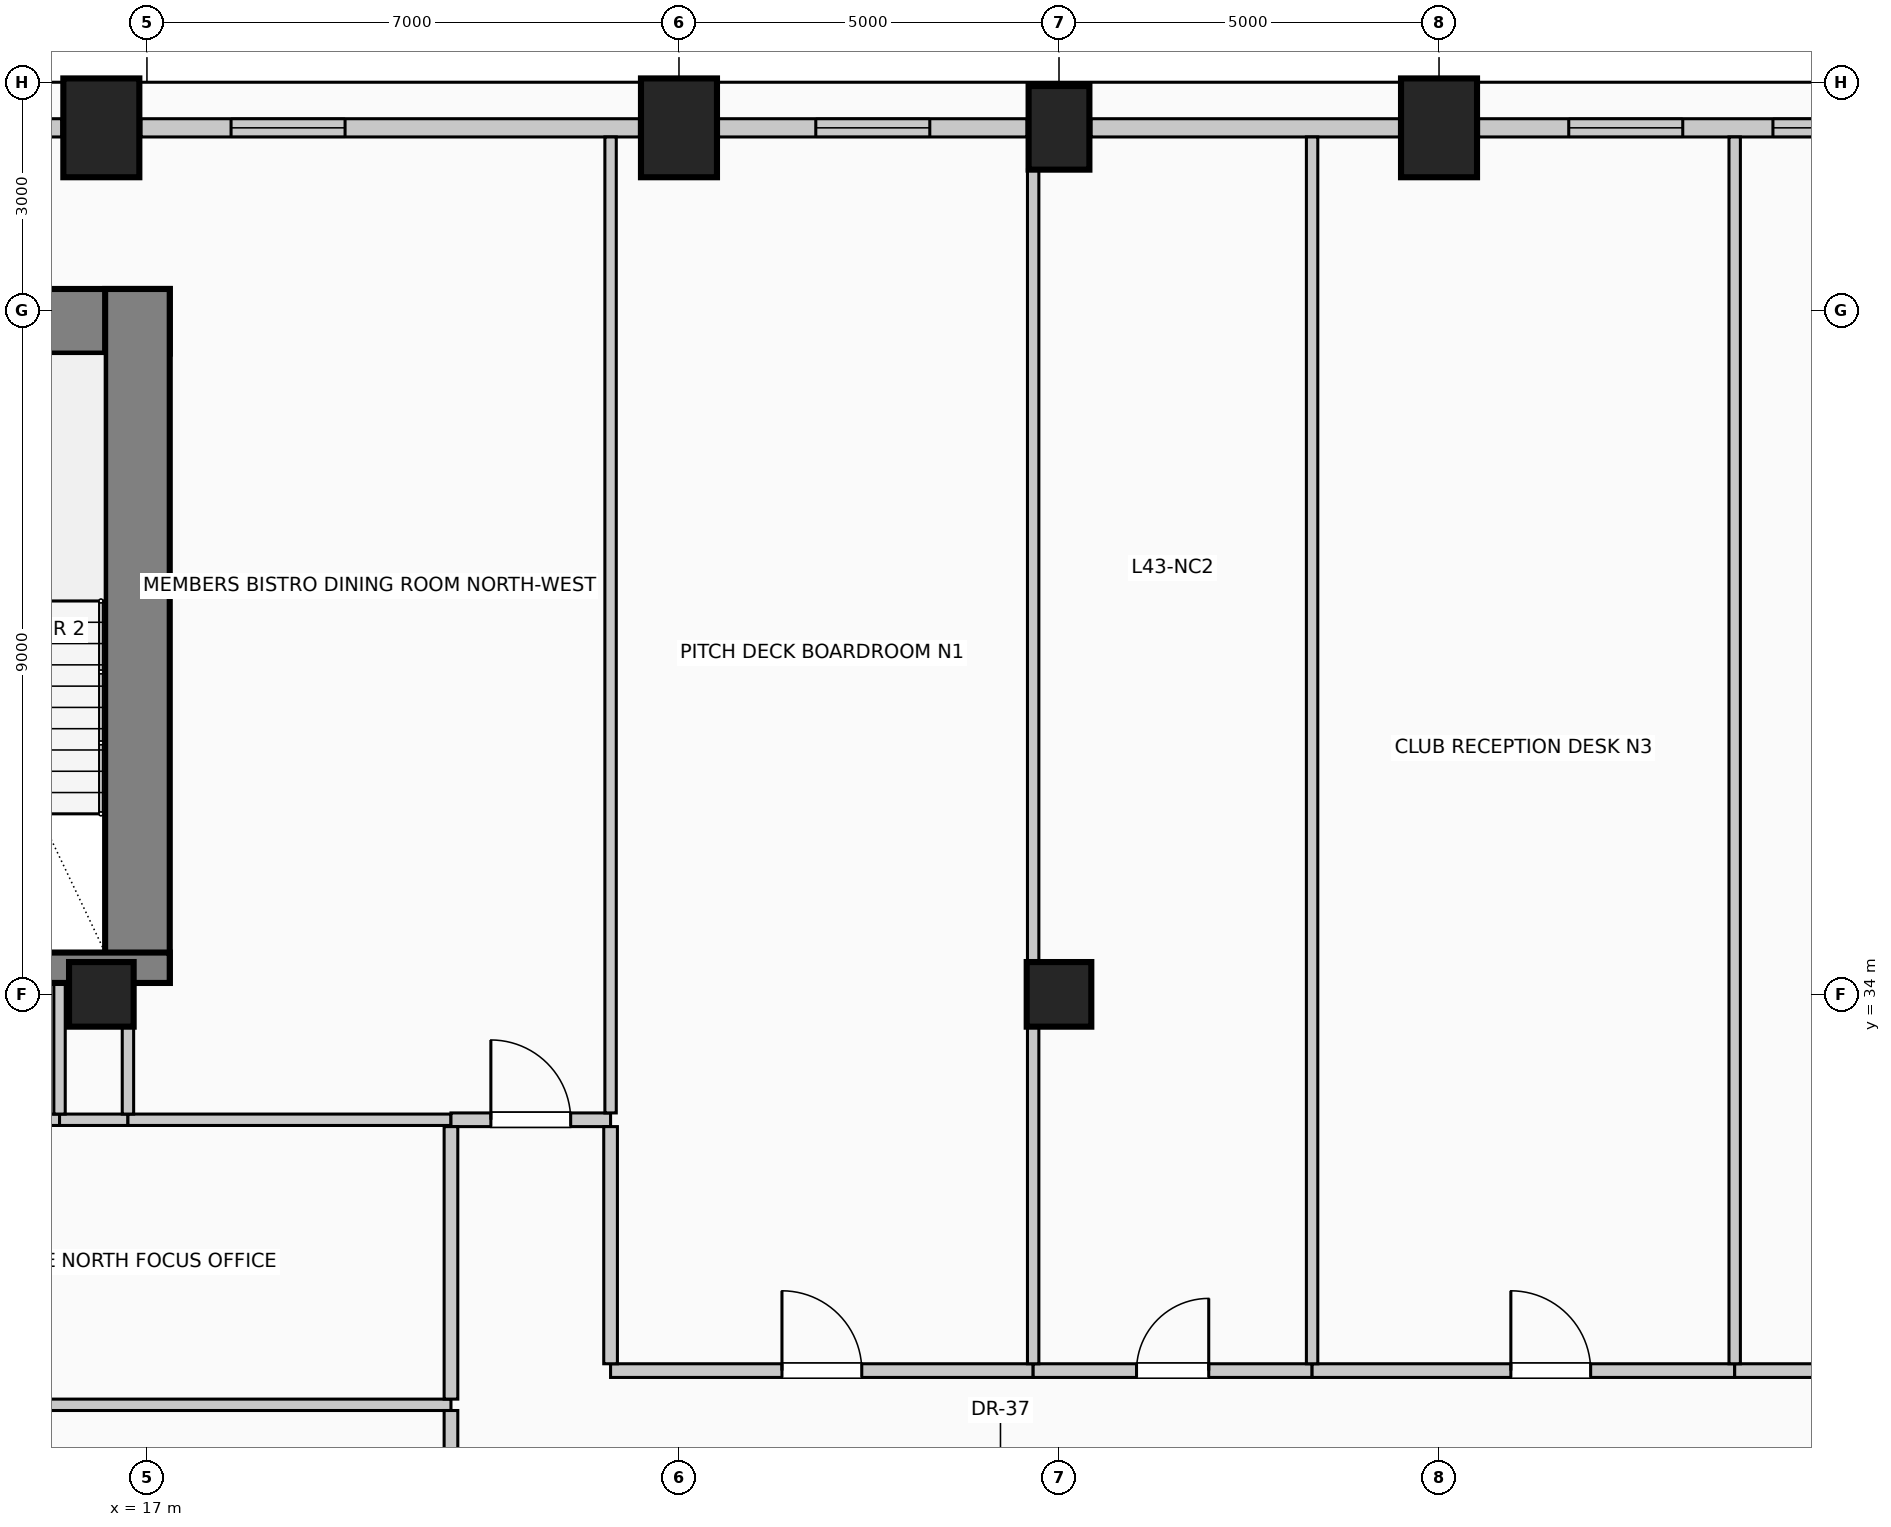
"""IFC4 building model, lengths in metres.
Left out: names, types, materials, properties, quantities, classifications, styles, units other than length and angle.
Written with IfcOpenShell. Run it as: python <this file> out.ifc"""

import sys

from ifc_helpers import new_model, si_unit, direction, frame, frame_2d, origin, origin_2d, place, context, subcontext, project, spatial, rectangle, circle, extrude, element, fill, save


model = new_model("IFC4")
c1 = context("Model", 3, precision=1e-05, world=origin(), true_north=direction((0.0, 1.0)))
c2 = subcontext(c1, "Body", "Model", "MODEL_VIEW")
j1 = project(units=[si_unit("LENGTHUNIT", "METRE"), si_unit("PLANEANGLEUNIT", "RADIAN")], contexts=[c1])
p1 = place(None, origin())
s1 = spatial("IfcSite", under=j1, at=p1, CompositionType="ELEMENT")
p2 = place(p1, origin())
s2 = spatial("IfcBuilding", under=s1, at=p2, CompositionType="ELEMENT")
p3 = place(p2, frame((0.0, 0.0, 178.6)))
s3 = spatial("IfcBuildingStorey", under=s2, at=p3, CompositionType="ELEMENT", Elevation=178.6)
p4 = place(p3, frame((2.7, 42.855, 0.0), z_axis=(0.0, 0.0, 1.0), x_axis=(1.0, 0.0, 0.0)))
e1 = element("IfcWall", 1, at=p4, inside=s3, PredefinedType="SHEAR", context=c2, shape_type="SweptSolid", body=[
    extrude(rectangle(XDim=14.6, YDim=0.85, at=frame_2d((7.3, 0.0))), origin(), (0.0, 0.0, 1.0), 4.0),
])
p5 = place(p3, frame((16.875, 34.15, 0.0), z_axis=(0.0, 0.0, 1.0), x_axis=(0.0, 1.0, 0.0)))
e2 = element("IfcWall", 2, at=p5, inside=s3, PredefinedType="SHEAR", context=c2, shape_type="SweptSolid", body=[
    extrude(rectangle(XDim=9.13, YDim=0.85, at=frame_2d((4.565, 0.0))), origin(), (0.0, 0.0, 1.0), 4.0),
])
p6 = place(p3, frame((12.29, 34.35, 0.0), z_axis=(0.0, 0.0, 1.0), x_axis=(1.0, 0.0, 0.0)))
e3 = element("IfcWall", 3, at=p6, inside=s3, PredefinedType="SHEAR", context=c2, shape_type="SweptSolid", body=[
    extrude(rectangle(XDim=5.01, YDim=0.4, at=frame_2d((2.505, 0.0))), origin(), (0.0, 0.0, 1.0), 4.0),
])
p7 = place(p6, frame((1.4, 0.0, 0.0)))
e4 = element("IfcOpeningElement", 4, at=p7, cuts=e3, PredefinedType="OPENING", context=c2, shape_type="SweptSolid", body=[
    extrude(rectangle(XDim=1.15, YDim=2.2, at=frame_2d((0.575, 1.1))), frame((0.0, 0.21, 0.0), z_axis=(0.0, -1.0, 0.0), x_axis=(1.0, 0.0, 0.0)), (0.0, 0.0, 1.0), 0.42),
])
for number, where, z_axis, x_axis in (
    (5, (16.4, 45.4, 0.0), (0.0, 0.0, 1.0), (1.0, 0.0, 0.0)),
    (6, (24.0, 45.4, 0.0), (0.0, 0.0, 1.0), (1.0, 0.0, 0.0)),
):
    element("IfcColumn", number, at=place(p3, frame(where, z_axis=z_axis, x_axis=x_axis)), inside=s3, PredefinedType="COLUMN", context=c2, shape_type="SweptSolid", body=[
        extrude(rectangle(XDim=1.0, YDim=1.3, at=origin_2d()), origin(), (0.0, 0.0, 1.0), 4.0),
    ])
p8 = place(p3, frame((29.0, 45.4, 0.0), z_axis=(0.0, 0.0, 1.0), x_axis=(1.0, 0.0, 0.0)))
e7 = element("IfcColumn", 7, at=p8, inside=s3, PredefinedType="COLUMN", context=c2, shape_type="SweptSolid", body=[
    extrude(rectangle(XDim=0.8, YDim=1.1, at=origin_2d()), origin(), (0.0, 0.0, 1.0), 4.0),
])
p9 = place(p3, frame((34.0, 45.4, 0.0), z_axis=(0.0, 0.0, 1.0), x_axis=(1.0, 0.0, 0.0)))
e8 = element("IfcColumn", 8, at=p9, inside=s3, PredefinedType="COLUMN", context=c2, shape_type="SweptSolid", body=[
    extrude(rectangle(XDim=1.0, YDim=1.3, at=origin_2d()), origin(), (0.0, 0.0, 1.0), 4.0),
])
for number, where, z_axis, x_axis in (
    (9, (16.4, 34.0, 0.0), (0.0, 0.0, 1.0), (1.0, 0.0, 0.0)),
    (10, (29.0, 34.0, 0.0), (0.0, 0.0, 1.0), (1.0, 0.0, 0.0)),
):
    element("IfcColumn", number, at=place(p3, frame(where, z_axis=z_axis, x_axis=x_axis)), inside=s3, PredefinedType="COLUMN", context=c2, shape_type="SweptSolid", body=[
        extrude(circle(Radius=0.425, at=origin_2d()), origin(), (0.0, 0.0, 1.0), 4.0),
    ])
p10 = place(p3, frame((14.42, 45.4, 0.0), z_axis=(0.0, 0.0, 1.0), x_axis=(1.0, 0.0, 0.0)))
e11 = element("IfcWall", 11, at=p10, inside=s3, PredefinedType="SOLIDWALL", context=c2, shape_type="SweptSolid", body=[
    extrude(rectangle(XDim=1.46, YDim=0.24, at=frame_2d((0.73, 0.0))), origin(), (0.0, 0.0, 1.0), 3.0),
])
p11 = place(p3, frame((16.92, 45.4, 0.0), z_axis=(0.0, 0.0, 1.0), x_axis=(1.0, 0.0, 0.0)))
e12 = element("IfcWall", 12, at=p11, inside=s3, PredefinedType="SOLIDWALL", context=c2, shape_type="SweptSolid", body=[
    extrude(rectangle(XDim=6.56, YDim=0.24, at=frame_2d((3.28, 0.0))), origin(), (0.0, 0.0, 1.0), 3.0),
])
p12 = place(p11, frame((1.187, 0.0, 0.42)))
e13 = element("IfcOpeningElement", 13, at=p12, cuts=e12, PredefinedType="OPENING", context=c2, shape_type="SweptSolid", body=[
    extrude(rectangle(XDim=1.5, YDim=2.2, at=frame_2d((0.75, 1.1))), frame((0.0, 0.13, 0.0), z_axis=(0.0, -1.0, 0.0), x_axis=(1.0, 0.0, 0.0)), (0.0, 0.0, 1.0), 0.26),
])
p13 = place(p3, frame((24.52, 45.4, 0.0), z_axis=(0.0, 0.0, 1.0), x_axis=(1.0, 0.0, 0.0)))
e14 = element("IfcWall", 14, at=p13, inside=s3, PredefinedType="SOLIDWALL", context=c2, shape_type="SweptSolid", body=[
    extrude(rectangle(XDim=4.06, YDim=0.24, at=frame_2d((2.03, 0.0))), origin(), (0.0, 0.0, 1.0), 3.75),
])
p14 = place(p13, frame((1.28, 0.0, 0.42)))
e15 = element("IfcOpeningElement", 15, at=p14, cuts=e14, PredefinedType="OPENING", context=c2, shape_type="SweptSolid", body=[
    extrude(rectangle(XDim=1.5, YDim=2.2, at=frame_2d((0.75, 1.1))), frame((0.0, 0.13, 0.0), z_axis=(0.0, -1.0, 0.0), x_axis=(1.0, 0.0, 0.0)), (0.0, 0.0, 1.0), 0.26),
])
p15 = place(p3, frame((29.42, 45.4, 0.0), z_axis=(0.0, 0.0, 1.0), x_axis=(1.0, 0.0, 0.0)))
e16 = element("IfcWall", 16, at=p15, inside=s3, PredefinedType="SOLIDWALL", context=c2, shape_type="SweptSolid", body=[
    extrude(rectangle(XDim=4.06, YDim=0.24, at=frame_2d((2.03, 0.0))), origin(), (0.0, 0.0, 1.0), 3.75),
])
p16 = place(p3, frame((34.52, 45.4, 0.0), z_axis=(0.0, 0.0, 1.0), x_axis=(1.0, 0.0, 0.0)))
e17 = element("IfcWall", 17, at=p16, inside=s3, PredefinedType="SOLIDWALL", context=c2, shape_type="SweptSolid", body=[
    extrude(rectangle(XDim=6.56, YDim=0.24, at=frame_2d((3.28, 0.0))), origin(), (0.0, 0.0, 1.0), 3.0),
])
p17 = place(p16, frame((1.187, 0.0, 0.42)))
e18 = element("IfcOpeningElement", 18, at=p17, cuts=e17, PredefinedType="OPENING", context=c2, shape_type="SweptSolid", body=[
    extrude(rectangle(XDim=1.5, YDim=2.2, at=frame_2d((0.75, 1.1))), frame((0.0, 0.13, 0.0), z_axis=(0.0, -1.0, 0.0), x_axis=(1.0, 0.0, 0.0)), (0.0, 0.0, 1.0), 0.26),
])
p18 = place(p16, frame((3.873, 0.0, 0.42)))
e19 = element("IfcOpeningElement", 19, at=p18, cuts=e17, PredefinedType="OPENING", context=c2, shape_type="SweptSolid", body=[
    extrude(rectangle(XDim=1.5, YDim=2.2, at=frame_2d((0.75, 1.1))), frame((0.0, 0.13, 0.0), z_axis=(0.0, -1.0, 0.0), x_axis=(1.0, 0.0, 0.0)), (0.0, 0.0, 1.0), 0.26),
])
p19 = place(p3, frame((12.2, 28.6, 0.0), z_axis=(0.0, 0.0, 1.0), x_axis=(1.0, 0.0, 0.0)))
e20 = element("IfcWall", 20, at=p19, inside=s3, PredefinedType="PARTITIONING", context=c2, shape_type="SweptSolid", body=[
    extrude(rectangle(XDim=8.8, YDim=0.15, at=frame_2d((4.4, 0.0))), origin(), (0.0, 0.0, 1.0), 3.75),
])
p20 = place(p3, frame((23.1, 29.05, 0.0), z_axis=(0.0, 0.0, 1.0), x_axis=(1.0, 0.0, 0.0)))
e21 = element("IfcWall", 21, at=p20, inside=s3, PredefinedType="PARTITIONING", context=c2, shape_type="SweptSolid", body=[
    extrude(rectangle(XDim=5.56, YDim=0.18, at=frame_2d((2.78, 0.0))), origin(), (0.0, 0.0, 1.0), 3.75),
])
p21 = place(p20, frame((2.255, 0.0, 0.0)))
e22 = element("IfcOpeningElement", 22, at=p21, cuts=e21, PredefinedType="OPENING", context=c2, shape_type="SweptSolid", body=[
    extrude(rectangle(XDim=1.05, YDim=2.15, at=frame_2d((0.525, 1.075))), frame((0.0, 0.1, 0.0), z_axis=(0.0, -1.0, 0.0), x_axis=(1.0, 0.0, 0.0)), (0.0, 0.0, 1.0), 0.2),
])
p22 = place(p3, frame((28.66, 29.05, 0.0), z_axis=(0.0, 0.0, 1.0), x_axis=(1.0, 0.0, 0.0)))
e23 = element("IfcWall", 23, at=p22, inside=s3, PredefinedType="PARTITIONING", context=c2, shape_type="SweptSolid", body=[
    extrude(rectangle(XDim=3.67, YDim=0.18, at=frame_2d((1.835, 0.0))), origin(), (0.0, 0.0, 1.0), 3.75),
])
p23 = place(p22, frame((1.36, 0.0, 0.0)))
e24 = element("IfcOpeningElement", 24, at=p23, cuts=e23, PredefinedType="OPENING", context=c2, shape_type="SweptSolid", body=[
    extrude(rectangle(XDim=0.95, YDim=2.15, at=frame_2d((0.475, 1.075))), frame((0.0, 0.1, 0.0), z_axis=(0.0, -1.0, 0.0), x_axis=(1.0, 0.0, 0.0)), (0.0, 0.0, 1.0), 0.2),
])
p24 = place(p3, frame((32.33, 29.05, 0.0), z_axis=(0.0, 0.0, 1.0), x_axis=(1.0, 0.0, 0.0)))
e25 = element("IfcWall", 25, at=p24, inside=s3, PredefinedType="PARTITIONING", context=c2, shape_type="SweptSolid", body=[
    extrude(rectangle(XDim=5.56, YDim=0.18, at=frame_2d((2.78, 0.0))), origin(), (0.0, 0.0, 1.0), 3.75),
])
p25 = place(p24, frame((2.615, 0.0, 0.0)))
e26 = element("IfcOpeningElement", 26, at=p25, cuts=e25, PredefinedType="OPENING", context=c2, shape_type="SweptSolid", body=[
    extrude(rectangle(XDim=1.05, YDim=2.15, at=frame_2d((0.525, 1.075))), frame((0.0, 0.1, 0.0), z_axis=(0.0, -1.0, 0.0), x_axis=(1.0, 0.0, 0.0)), (0.0, 0.0, 1.0), 0.2),
])
p26 = place(p3, frame((37.89, 29.05, 0.0), z_axis=(0.0, 0.0, 1.0), x_axis=(1.0, 0.0, 0.0)))
e27 = element("IfcWall", 27, at=p26, inside=s3, PredefinedType="PARTITIONING", context=c2, shape_type="SweptSolid", body=[
    extrude(rectangle(XDim=3.66, YDim=0.18, at=frame_2d((1.83, 0.0))), origin(), (0.0, 0.0, 1.0), 3.75),
])
p27 = place(p26, frame((1.355, 0.0, 0.0)))
e28 = element("IfcOpeningElement", 28, at=p27, cuts=e27, PredefinedType="OPENING", context=c2, shape_type="SweptSolid", body=[
    extrude(rectangle(XDim=0.95, YDim=2.15, at=frame_2d((0.475, 1.075))), frame((0.0, 0.1, 0.0), z_axis=(0.0, -1.0, 0.0), x_axis=(1.0, 0.0, 0.0)), (0.0, 0.0, 1.0), 0.2),
])
p28 = place(p3, frame((12.33, 32.35, 0.0), z_axis=(0.0, 0.0, 1.0), x_axis=(1.0, 0.0, 0.0)))
e29 = element("IfcWall", 29, at=p28, inside=s3, PredefinedType="PARTITIONING", context=c2, shape_type="SweptSolid", body=[
    extrude(rectangle(XDim=3.52, YDim=0.15, at=frame_2d((1.76, 0.0))), origin(), (0.0, 0.0, 1.0), 3.75),
])
p29 = place(p28, frame((1.285, 0.0, 0.0)))
e30 = element("IfcOpeningElement", 30, at=p29, cuts=e29, PredefinedType="OPENING", context=c2, shape_type="SweptSolid", body=[
    extrude(rectangle(XDim=0.95, YDim=2.15, at=frame_2d((0.475, 1.075))), frame((0.0, 0.085, 0.0), z_axis=(0.0, -1.0, 0.0), x_axis=(1.0, 0.0, 0.0)), (0.0, 0.0, 1.0), 0.17),
])
p30 = place(p3, frame((15.85, 32.35, 0.0), z_axis=(0.0, 0.0, 1.0), x_axis=(1.0, 0.0, 0.0)))
e31 = element("IfcWall", 31, at=p30, inside=s3, PredefinedType="PARTITIONING", context=c2, shape_type="SweptSolid", body=[
    extrude(rectangle(XDim=0.9, YDim=0.15, at=frame_2d((0.45, 0.0))), origin(), (0.0, 0.0, 1.0), 3.75),
])
p31 = place(p3, frame((16.75, 32.35, 0.0), z_axis=(0.0, 0.0, 1.0), x_axis=(1.0, 0.0, 0.0)))
e32 = element("IfcWall", 32, at=p31, inside=s3, PredefinedType="PARTITIONING", context=c2, shape_type="SweptSolid", body=[
    extrude(rectangle(XDim=4.25, YDim=0.15, at=frame_2d((2.125, 0.0))), origin(), (0.0, 0.0, 1.0), 3.75),
])
p32 = place(p3, frame((21.0, 32.35, 0.0), z_axis=(0.0, 0.0, 1.0), x_axis=(1.0, 0.0, 0.0)))
e33 = element("IfcWall", 33, at=p32, inside=s3, PredefinedType="PARTITIONING", context=c2, shape_type="SweptSolid", body=[
    extrude(rectangle(XDim=2.1, YDim=0.18, at=frame_2d((1.05, 0.0))), origin(), (0.0, 0.0, 1.0), 3.75),
])
p33 = place(p32, frame((0.525, 0.0, 0.0)))
e34 = element("IfcOpeningElement", 34, at=p33, cuts=e33, PredefinedType="OPENING", context=c2, shape_type="SweptSolid", body=[
    extrude(rectangle(XDim=1.05, YDim=2.15, at=frame_2d((0.525, 1.075))), frame((0.0, 0.1, 0.0), z_axis=(0.0, -1.0, 0.0), x_axis=(1.0, 0.0, 0.0)), (0.0, 0.0, 1.0), 0.2),
])
p34 = place(p3, frame((15.85, 32.425, 0.0), z_axis=(0.0, 0.0, 1.0), x_axis=(0.0, 1.0, 0.0)))
e35 = element("IfcWall", 35, at=p34, inside=s3, PredefinedType="PARTITIONING", context=c2, shape_type="SweptSolid", body=[
    extrude(rectangle(XDim=1.725, YDim=0.15, at=frame_2d((0.862, 0.0))), origin(), (0.0, 0.0, 1.0), 3.75),
])
p35 = place(p3, frame((16.75, 32.425, 0.0), z_axis=(0.0, 0.0, 1.0), x_axis=(0.0, 1.0, 0.0)))
e36 = element("IfcWall", 36, at=p35, inside=s3, PredefinedType="PARTITIONING", context=c2, shape_type="SweptSolid", body=[
    extrude(rectangle(XDim=1.15, YDim=0.15, at=frame_2d((0.575, 0.0))), origin(), (0.0, 0.0, 1.0), 3.75),
])
p36 = place(p3, frame((21.0, 24.875, 0.0), z_axis=(0.0, 0.0, 1.0), x_axis=(0.0, 1.0, 0.0)))
e37 = element("IfcWall", 37, at=p36, inside=s3, PredefinedType="PARTITIONING", context=c2, shape_type="SweptSolid", body=[
    extrude(rectangle(XDim=3.65, YDim=0.18, at=frame_2d((1.825, 0.0))), origin(), (0.0, 0.0, 1.0), 3.75),
])
p37 = place(p3, frame((21.0, 28.675, 0.0), z_axis=(0.0, 0.0, 1.0), x_axis=(0.0, 1.0, 0.0)))
e38 = element("IfcWall", 38, at=p37, inside=s3, PredefinedType="PARTITIONING", context=c2, shape_type="SweptSolid", body=[
    extrude(rectangle(XDim=3.585, YDim=0.18, at=frame_2d((1.792, 0.0))), origin(), (0.0, 0.0, 1.0), 3.75),
])
p38 = place(p3, frame((23.1, 29.14, 0.0), z_axis=(0.0, 0.0, 1.0), x_axis=(0.0, 1.0, 0.0)))
e39 = element("IfcWall", 39, at=p38, inside=s3, PredefinedType="PARTITIONING", context=c2, shape_type="SweptSolid", body=[
    extrude(rectangle(XDim=3.12, YDim=0.18, at=frame_2d((1.56, 0.0))), origin(), (0.0, 0.0, 1.0), 3.75),
])
p39 = place(p3, frame((23.1, 32.44, 0.0), z_axis=(0.0, 0.0, 1.0), x_axis=(0.0, 1.0, 0.0)))
e40 = element("IfcWall", 40, at=p39, inside=s3, PredefinedType="PARTITIONING", context=c2, shape_type="SweptSolid", body=[
    extrude(rectangle(XDim=12.84, YDim=0.15, at=frame_2d((6.42, 0.0))), origin(), (0.0, 0.0, 1.0), 3.75),
])
p40 = place(p3, frame((28.66, 29.14, 0.0), z_axis=(0.0, 0.0, 1.0), x_axis=(0.0, 1.0, 0.0)))
e41 = element("IfcWall", 41, at=p40, inside=s3, PredefinedType="PARTITIONING", context=c2, shape_type="SweptSolid", body=[
    extrude(rectangle(XDim=4.435, YDim=0.15, at=frame_2d((2.218, 0.0))), origin(), (0.0, 0.0, 1.0), 3.75),
])
p41 = place(p3, frame((28.66, 34.425, 0.0), z_axis=(0.0, 0.0, 1.0), x_axis=(0.0, 1.0, 0.0)))
e42 = element("IfcWall", 42, at=p41, inside=s3, PredefinedType="PARTITIONING", context=c2, shape_type="SweptSolid", body=[
    extrude(rectangle(XDim=10.425, YDim=0.15, at=frame_2d((5.212, 0.0))), origin(), (0.0, 0.0, 1.0), 3.75),
])
for number, where, z_axis, x_axis in (
    (43, (32.33, 29.14, 0.0), (0.0, 0.0, 1.0), (0.0, 1.0, 0.0)),
    (44, (37.89, 29.14, 0.0), (0.0, 0.0, 1.0), (0.0, 1.0, 0.0)),
):
    element("IfcWall", number, at=place(p3, frame(where, z_axis=z_axis, x_axis=x_axis)), inside=s3, PredefinedType="PARTITIONING", context=c2, shape_type="SweptSolid", body=[
        extrude(rectangle(XDim=16.14, YDim=0.15, at=frame_2d((8.07, 0.0))), origin(), (0.0, 0.0, 1.0), 3.75),
    ])
p42 = place(p12, origin())
e45 = element("IfcWindow", 45, at=p42, inside=s3, PartitioningType="SINGLE_PANEL", PredefinedType="WINDOW", context=c2, shape_type="SweptSolid", body=[
    extrude(rectangle(XDim=1.5, YDim=2.2, at=frame_2d((0.75, 1.1))), frame((0.0, 0.03, 0.0), z_axis=(0.0, -1.0, 0.0), x_axis=(1.0, 0.0, 0.0)), (0.0, 0.0, 1.0), 0.06),
])
fill(e13, e45)
p43 = place(p14, origin())
e46 = element("IfcWindow", 46, at=p43, inside=s3, PartitioningType="SINGLE_PANEL", PredefinedType="WINDOW", context=c2, shape_type="SweptSolid", body=[
    extrude(rectangle(XDim=1.5, YDim=2.2, at=frame_2d((0.75, 1.1))), frame((0.0, 0.03, 0.0), z_axis=(0.0, -1.0, 0.0), x_axis=(1.0, 0.0, 0.0)), (0.0, 0.0, 1.0), 0.06),
])
fill(e15, e46)
p44 = place(p17, origin())
e47 = element("IfcWindow", 47, at=p44, inside=s3, PartitioningType="SINGLE_PANEL", PredefinedType="WINDOW", context=c2, shape_type="SweptSolid", body=[
    extrude(rectangle(XDim=1.5, YDim=2.2, at=frame_2d((0.75, 1.1))), frame((0.0, 0.03, 0.0), z_axis=(0.0, -1.0, 0.0), x_axis=(1.0, 0.0, 0.0)), (0.0, 0.0, 1.0), 0.06),
])
fill(e18, e47)
p45 = place(p18, origin())
e48 = element("IfcWindow", 48, at=p45, inside=s3, PartitioningType="SINGLE_PANEL", PredefinedType="WINDOW", context=c2, shape_type="SweptSolid", body=[
    extrude(rectangle(XDim=1.5, YDim=2.2, at=frame_2d((0.75, 1.1))), frame((0.0, 0.03, 0.0), z_axis=(0.0, -1.0, 0.0), x_axis=(1.0, 0.0, 0.0)), (0.0, 0.0, 1.0), 0.06),
])
fill(e19, e48)
p46 = place(p21, origin())
e49 = element("IfcDoor", 49, at=p46, inside=s3, OperationType="SINGLE_SWING_LEFT", PredefinedType="DOOR", context=c2, shape_type="SweptSolid", body=[
    extrude(rectangle(XDim=1.05, YDim=2.15, at=frame_2d((0.525, 1.075))), frame((0.0, 0.025, 0.0), z_axis=(0.0, -1.0, 0.0), x_axis=(1.0, 0.0, 0.0)), (0.0, 0.0, 1.0), 0.05),
])
fill(e22, e49)
p47 = place(p23, origin())
e50 = element("IfcDoor", 50, at=p47, inside=s3, OperationType="SINGLE_SWING_RIGHT", PredefinedType="DOOR", context=c2, shape_type="SweptSolid", body=[
    extrude(rectangle(XDim=0.95, YDim=2.15, at=frame_2d((0.475, 1.075))), frame((0.0, 0.025, 0.0), z_axis=(0.0, -1.0, 0.0), x_axis=(1.0, 0.0, 0.0)), (0.0, 0.0, 1.0), 0.05),
])
fill(e24, e50)
p48 = place(p25, origin())
e51 = element("IfcDoor", 51, at=p48, inside=s3, OperationType="SINGLE_SWING_LEFT", PredefinedType="DOOR", context=c2, shape_type="SweptSolid", body=[
    extrude(rectangle(XDim=1.05, YDim=2.15, at=frame_2d((0.525, 1.075))), frame((0.0, 0.025, 0.0), z_axis=(0.0, -1.0, 0.0), x_axis=(1.0, 0.0, 0.0)), (0.0, 0.0, 1.0), 0.05),
])
fill(e26, e51)
p49 = place(p33, origin())
e52 = element("IfcDoor", 52, at=p49, inside=s3, OperationType="SINGLE_SWING_LEFT", PredefinedType="DOOR", context=c2, shape_type="SweptSolid", body=[
    extrude(rectangle(XDim=1.05, YDim=2.15, at=frame_2d((0.525, 1.075))), frame((0.0, 0.025, 0.0), z_axis=(0.0, -1.0, 0.0), x_axis=(1.0, 0.0, 0.0)), (0.0, 0.0, 1.0), 0.05),
])
fill(e34, e52)
save(model, sys.argv[1])
